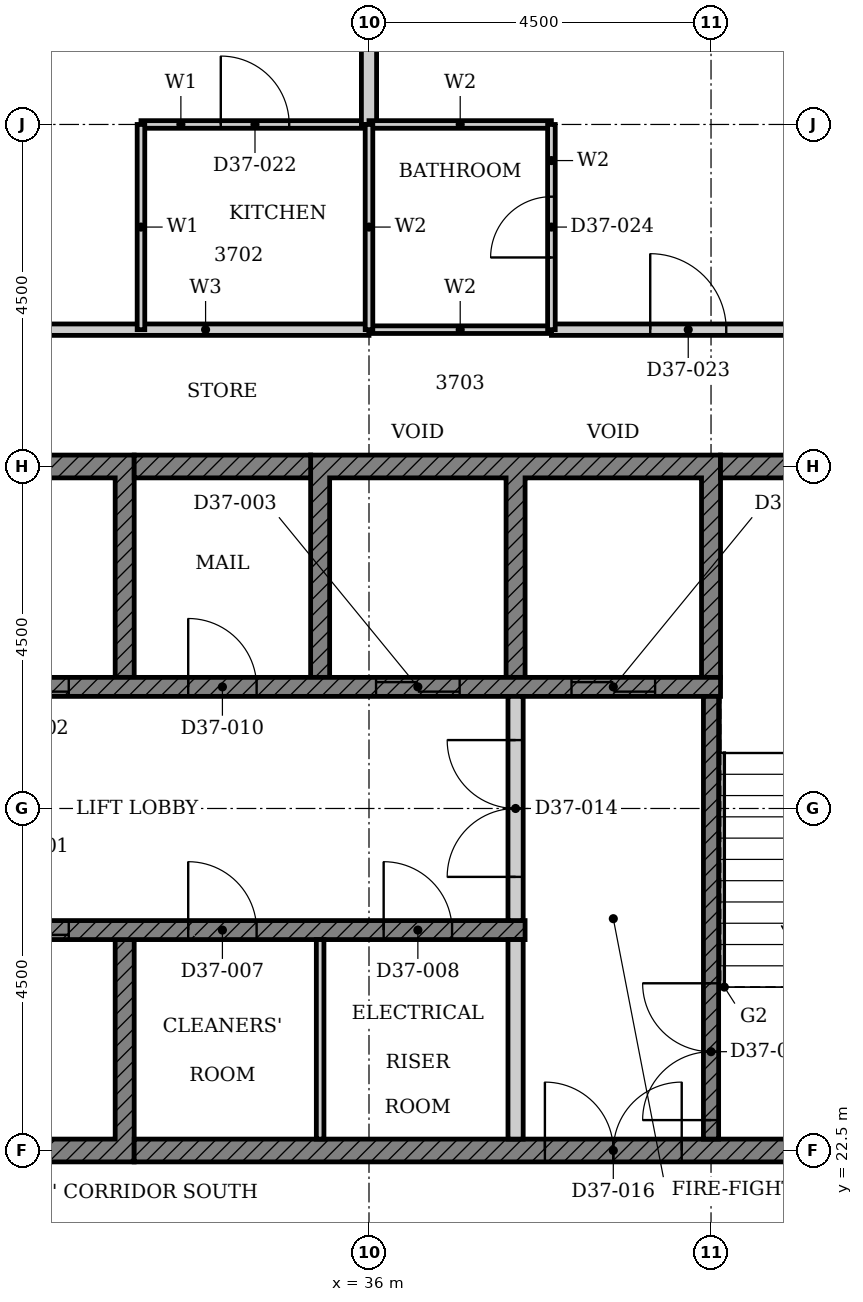
"""IFC4 building model, lengths in metres.
Left out: names, types, materials, properties, quantities, classifications, styles, units other than length and angle.
Written with IfcOpenShell. Run it as: python <this file> out.ifc"""

import sys

from ifc_helpers import new_model, si_unit, direction, frame, frame_2d, origin, place, context, subcontext, project, spatial, polyline, rectangle, outline, extrude, element, fill, save


model = new_model("IFC4")
c1 = context("Model", 3, precision=1e-05, world=origin(), true_north=direction((0.0, 1.0)))
c2 = subcontext(c1, "Body", "Model", "MODEL_VIEW")
j1 = project(units=[si_unit("LENGTHUNIT", "METRE"), si_unit("PLANEANGLEUNIT", "RADIAN")], contexts=[c1])
p1 = place(None, origin())
s1 = spatial("IfcSite", under=j1, at=p1, CompositionType="ELEMENT")
p2 = place(p1, origin())
s2 = spatial("IfcBuilding", under=s1, at=p2, CompositionType="ELEMENT")
p3 = place(p2, frame((0.0, 0.0, 150.6)))
s3 = spatial("IfcBuildingStorey", under=s2, at=p3, CompositionType="ELEMENT", Elevation=150.6)
p4 = place(p3, origin())
e1 = element("IfcWall", 1, at=p4, inside=s3, PredefinedType="SHEAR", context=c2, shape_type="SweptSolid", body=[
    extrude(outline(polyline([(27.518, 22.35), (32.911, 22.35), (32.911, 25.275), (32.661, 25.275), (32.661, 22.65), (30.339, 22.65), (30.339, 25.275), (30.089, 25.275), (30.089, 22.65), (27.768, 22.65), (27.768, 25.275), (27.518, 25.275), (27.518, 22.35)])), origin(), (0.0, 0.0, 1.0), 3.4),
])
p5 = place(p3, origin())
e2 = element("IfcWall", 2, at=p5, inside=s3, PredefinedType="SHEAR", context=c2, shape_type="SweptSolid", body=[
    extrude(outline(polyline([(27.518, 28.725), (27.768, 28.725), (27.768, 31.35), (30.089, 31.35), (30.089, 28.725), (30.339, 28.725), (30.339, 31.35), (32.661, 31.35), (32.661, 28.725), (32.911, 28.725), (32.911, 31.65), (27.518, 31.65), (27.518, 28.725)])), origin(), (0.0, 0.0, 1.0), 3.4),
])
p6 = place(p3, origin())
e3 = element("IfcWall", 3, at=p6, inside=s3, PredefinedType="SHEAR", context=c2, shape_type="SweptSolid", body=[
    extrude(outline(polyline([(35.232, 28.725), (35.482, 28.725), (35.482, 31.35), (37.803, 31.35), (37.803, 28.725), (38.053, 28.725), (38.053, 31.35), (40.375, 31.35), (40.375, 28.725), (40.625, 28.725), (40.625, 31.65), (35.232, 31.65), (35.232, 28.725)])), origin(), (0.0, 0.0, 1.0), 3.4),
])
p7 = place(p3, frame((32.911, 22.5, 0.0), z_axis=(0.0, 0.0, 1.0), x_axis=(1.0, 0.0, 0.0)))
e4 = element("IfcWall", 4, at=p7, inside=s3, PredefinedType="SHEAR", context=c2, shape_type="SweptSolid", body=[
    extrude(rectangle(XDim=11.939, YDim=0.3, at=frame_2d((5.97, 0.0))), origin(), (0.0, 0.0, 1.0), 3.4),
])
p8 = place(p7, frame((5.404, 0.0, 0.0)))
e5 = element("IfcOpeningElement", 5, at=p8, cuts=e4, PredefinedType="OPENING", context=c2, shape_type="SweptSolid", body=[
    extrude(rectangle(XDim=1.8, YDim=2.1, at=frame_2d((0.9, 1.05))), frame((0.0, 0.16, 0.0), z_axis=(0.0, -1.0, 0.0), x_axis=(1.0, 0.0, 0.0)), (0.0, 0.0, 1.0), 0.32),
])
p9 = place(p3, frame((32.911, 31.5, 0.0), z_axis=(0.0, 0.0, 1.0), x_axis=(1.0, 0.0, 0.0)))
e6 = element("IfcWall", 6, at=p9, inside=s3, PredefinedType="SHEAR", context=c2, shape_type="SweptSolid", body=[
    extrude(rectangle(XDim=2.322, YDim=0.3, at=frame_2d((1.161, 0.0))), origin(), (0.0, 0.0, 1.0), 3.4),
])
p10 = place(p3, frame((40.625, 31.5, 0.0), z_axis=(0.0, 0.0, 1.0), x_axis=(1.0, 0.0, 0.0)))
e7 = element("IfcWall", 7, at=p10, inside=s3, PredefinedType="SHEAR", context=c2, shape_type="SweptSolid", body=[
    extrude(rectangle(XDim=4.225, YDim=0.3, at=frame_2d((2.113, 0.0))), origin(), (0.0, 0.0, 1.0), 3.4),
])
p11 = place(p3, frame((22.375, 25.4, 0.0), z_axis=(0.0, 0.0, 1.0), x_axis=(1.0, 0.0, 0.0)))
e8 = element("IfcWall", 8, at=p11, inside=s3, PredefinedType="SHEAR", context=c2, shape_type="SweptSolid", body=[
    extrude(rectangle(XDim=15.678, YDim=0.25, at=frame_2d((7.839, 0.0))), origin(), (0.0, 0.0, 1.0), 3.4),
])
p12 = place(p11, frame((8.575, 0.0, 0.0)))
e9 = element("IfcOpeningElement", 9, at=p12, cuts=e8, PredefinedType="OPENING", context=c2, shape_type="SweptSolid", body=[
    extrude(rectangle(XDim=1.1, YDim=2.1, at=frame_2d((0.55, 1.05))), frame((0.0, 0.135, 0.0), z_axis=(0.0, -1.0, 0.0), x_axis=(1.0, 0.0, 0.0)), (0.0, 0.0, 1.0), 0.27),
])
p13 = place(p11, frame((0.861, 0.0, 0.0)))
e10 = element("IfcOpeningElement", 10, at=p13, cuts=e8, PredefinedType="OPENING", context=c2, shape_type="SweptSolid", body=[
    extrude(rectangle(XDim=1.1, YDim=2.1, at=frame_2d((0.55, 1.05))), frame((0.0, 0.135, 0.0), z_axis=(0.0, -1.0, 0.0), x_axis=(1.0, 0.0, 0.0)), (0.0, 0.0, 1.0), 0.27),
])
p14 = place(p11, frame((3.532, 0.0, 0.0)))
e11 = element("IfcOpeningElement", 11, at=p14, cuts=e8, PredefinedType="OPENING", context=c2, shape_type="SweptSolid", body=[
    extrude(rectangle(XDim=0.9, YDim=2.1, at=frame_2d((0.45, 1.05))), frame((0.0, 0.135, 0.0), z_axis=(0.0, -1.0, 0.0), x_axis=(1.0, 0.0, 0.0)), (0.0, 0.0, 1.0), 0.27),
])
p15 = place(p11, frame((11.246, 0.0, 0.0)))
e12 = element("IfcOpeningElement", 12, at=p15, cuts=e8, PredefinedType="OPENING", context=c2, shape_type="SweptSolid", body=[
    extrude(rectangle(XDim=0.9, YDim=2.1, at=frame_2d((0.45, 1.05))), frame((0.0, 0.135, 0.0), z_axis=(0.0, -1.0, 0.0), x_axis=(1.0, 0.0, 0.0)), (0.0, 0.0, 1.0), 0.27),
])
p16 = place(p11, frame((13.818, 0.0, 0.0)))
e13 = element("IfcOpeningElement", 13, at=p16, cuts=e8, PredefinedType="OPENING", context=c2, shape_type="SweptSolid", body=[
    extrude(rectangle(XDim=0.9, YDim=2.1, at=frame_2d((0.45, 1.05))), frame((0.0, 0.135, 0.0), z_axis=(0.0, -1.0, 0.0), x_axis=(1.0, 0.0, 0.0)), (0.0, 0.0, 1.0), 0.27),
])
p17 = place(p3, frame((24.947, 28.6, 0.0), z_axis=(0.0, 0.0, 1.0), x_axis=(1.0, 0.0, 0.0)))
e14 = element("IfcWall", 14, at=p17, inside=s3, PredefinedType="SHEAR", context=c2, shape_type="SweptSolid", body=[
    extrude(rectangle(XDim=15.678, YDim=0.25, at=frame_2d((7.839, 0.0))), origin(), (0.0, 0.0, 1.0), 3.4),
])
p18 = place(p17, frame((6.004, 0.0, 0.0)))
e15 = element("IfcOpeningElement", 15, at=p18, cuts=e14, PredefinedType="OPENING", context=c2, shape_type="SweptSolid", body=[
    extrude(rectangle(XDim=1.1, YDim=2.1, at=frame_2d((0.55, 1.05))), frame((0.0, 0.135, 0.0), z_axis=(0.0, -1.0, 0.0), x_axis=(1.0, 0.0, 0.0)), (0.0, 0.0, 1.0), 0.27),
])
p19 = place(p17, frame((11.146, 0.0, 0.0)))
e16 = element("IfcOpeningElement", 16, at=p19, cuts=e14, PredefinedType="OPENING", context=c2, shape_type="SweptSolid", body=[
    extrude(rectangle(XDim=1.1, YDim=2.1, at=frame_2d((0.55, 1.05))), frame((0.0, 0.135, 0.0), z_axis=(0.0, -1.0, 0.0), x_axis=(1.0, 0.0, 0.0)), (0.0, 0.0, 1.0), 0.27),
])
p20 = place(p17, frame((13.718, 0.0, 0.0)))
e17 = element("IfcOpeningElement", 17, at=p20, cuts=e14, PredefinedType="OPENING", context=c2, shape_type="SweptSolid", body=[
    extrude(rectangle(XDim=1.1, YDim=2.1, at=frame_2d((0.55, 1.05))), frame((0.0, 0.135, 0.0), z_axis=(0.0, -1.0, 0.0), x_axis=(1.0, 0.0, 0.0)), (0.0, 0.0, 1.0), 0.27),
])
p21 = place(p17, frame((0.961, 0.0, 0.0)))
e18 = element("IfcOpeningElement", 18, at=p21, cuts=e14, PredefinedType="OPENING", context=c2, shape_type="SweptSolid", body=[
    extrude(rectangle(XDim=0.9, YDim=2.1, at=frame_2d((0.45, 1.05))), frame((0.0, 0.135, 0.0), z_axis=(0.0, -1.0, 0.0), x_axis=(1.0, 0.0, 0.0)), (0.0, 0.0, 1.0), 0.27),
])
p22 = place(p17, frame((8.675, 0.0, 0.0)))
e19 = element("IfcOpeningElement", 19, at=p22, cuts=e14, PredefinedType="OPENING", context=c2, shape_type="SweptSolid", body=[
    extrude(rectangle(XDim=0.9, YDim=2.1, at=frame_2d((0.45, 1.05))), frame((0.0, 0.135, 0.0), z_axis=(0.0, -1.0, 0.0), x_axis=(1.0, 0.0, 0.0)), (0.0, 0.0, 1.0), 0.27),
])
p23 = place(p3, frame((37.928, 22.65, 0.0), z_axis=(0.0, 0.0, 1.0), x_axis=(0.0, 1.0, 0.0)))
e20 = element("IfcWall", 20, at=p23, inside=s3, PredefinedType="PARTITIONING", context=c2, shape_type="SweptSolid", body=[
    extrude(rectangle(XDim=2.625, YDim=0.2, at=frame_2d((1.312, 0.0))), origin(), (0.0, 0.0, 1.0), 3.4),
])
p24 = place(p3, frame((35.357, 22.65, 0.0), z_axis=(0.0, 0.0, 1.0), x_axis=(0.0, 1.0, 0.0)))
e21 = element("IfcWall", 21, at=p24, inside=s3, PredefinedType="PARTITIONING", context=c2, shape_type="SweptSolid", body=[
    extrude(rectangle(XDim=2.625, YDim=0.1, at=frame_2d((1.312, 0.0))), origin(), (0.0, 0.0, 1.0), 3.4),
])
p25 = place(p3, frame((40.5, 22.65, 0.0), z_axis=(0.0, 0.0, 1.0), x_axis=(0.0, 1.0, 0.0)))
e22 = element("IfcWall", 22, at=p25, inside=s3, PredefinedType="SHEAR", context=c2, shape_type="SweptSolid", body=[
    extrude(rectangle(XDim=5.825, YDim=0.2, at=frame_2d((2.913, 0.0))), origin(), (0.0, 0.0, 1.0), 3.4),
])
p26 = place(p25, frame((0.25, 0.0, 0.0)))
e23 = element("IfcOpeningElement", 23, at=p26, cuts=e22, PredefinedType="OPENING", context=c2, shape_type="SweptSolid", body=[
    extrude(rectangle(XDim=1.8, YDim=2.1, at=frame_2d((0.9, 1.05))), frame((0.0, 0.11, 0.0), z_axis=(0.0, -1.0, 0.0), x_axis=(1.0, 0.0, 0.0)), (0.0, 0.0, 1.0), 0.22),
])
p27 = place(p3, frame((37.928, 25.525, 0.0), z_axis=(0.0, 0.0, 1.0), x_axis=(0.0, 1.0, 0.0)))
e24 = element("IfcWall", 24, at=p27, inside=s3, PredefinedType="PARTITIONING", context=c2, shape_type="SweptSolid", body=[
    extrude(rectangle(XDim=2.95, YDim=0.2, at=frame_2d((1.475, 0.0))), origin(), (0.0, 0.0, 1.0), 3.4),
])
p28 = place(p27, frame((0.575, 0.0, 0.0)))
e25 = element("IfcOpeningElement", 25, at=p28, cuts=e24, PredefinedType="OPENING", context=c2, shape_type="SweptSolid", body=[
    extrude(rectangle(XDim=1.8, YDim=2.1, at=frame_2d((0.9, 1.05))), frame((0.0, 0.11, 0.0), z_axis=(0.0, -1.0, 0.0), x_axis=(1.0, 0.0, 0.0)), (0.0, 0.0, 1.0), 0.22),
])
p29 = place(p3, frame((29.4, 33.3, 0.0), z_axis=(0.0, 0.0, 1.0), x_axis=(1.0, 0.0, 0.0)))
e26 = element("IfcWall", 26, at=p29, inside=s3, PredefinedType="PARTITIONING", context=c2, shape_type="SweptSolid", body=[
    extrude(rectangle(XDim=6.6, YDim=0.15, at=frame_2d((3.3, 0.0))), origin(), (0.0, 0.0, 1.0), 3.4),
])
p30 = place(p29, frame((1.3, 0.0, 0.0)))
e27 = element("IfcOpeningElement", 27, at=p30, cuts=e26, PredefinedType="OPENING", context=c2, shape_type="SweptSolid", body=[
    extrude(rectangle(XDim=1.0, YDim=2.2, at=frame_2d((0.5, 1.1))), frame((0.0, 0.085, 0.0), z_axis=(0.0, -1.0, 0.0), x_axis=(1.0, 0.0, 0.0)), (0.0, 0.0, 1.0), 0.17),
])
p31 = place(p3, frame((38.4, 33.3, 0.0), z_axis=(0.0, 0.0, 1.0), x_axis=(1.0, 0.0, 0.0)))
e28 = element("IfcWall", 28, at=p31, inside=s3, PredefinedType="PARTITIONING", context=c2, shape_type="SweptSolid", body=[
    extrude(rectangle(XDim=6.6, YDim=0.15, at=frame_2d((3.3, 0.0))), origin(), (0.0, 0.0, 1.0), 3.4),
])
p32 = place(p31, frame((1.3, 0.0, 0.0)))
e29 = element("IfcOpeningElement", 29, at=p32, cuts=e28, PredefinedType="OPENING", context=c2, shape_type="SweptSolid", body=[
    extrude(rectangle(XDim=1.0, YDim=2.2, at=frame_2d((0.5, 1.1))), frame((0.0, 0.085, 0.0), z_axis=(0.0, -1.0, 0.0), x_axis=(1.0, 0.0, 0.0)), (0.0, 0.0, 1.0), 0.17),
])
p33 = place(p3, frame((33.0, 36.0, 0.0), z_axis=(0.0, 0.0, 1.0), x_axis=(1.0, 0.0, 0.0)))
e30 = element("IfcWall", 30, at=p33, inside=s3, PredefinedType="PARTITIONING", context=c2, shape_type="SweptSolid", body=[
    extrude(rectangle(XDim=3.0, YDim=0.1, at=frame_2d((1.5, 0.0))), origin(), (0.0, 0.0, 1.0), 3.4),
])
p34 = place(p33, frame((1.05, 0.0, 0.0)))
e31 = element("IfcOpeningElement", 31, at=p34, cuts=e30, PredefinedType="OPENING", context=c2, shape_type="SweptSolid", body=[
    extrude(rectangle(XDim=0.9, YDim=2.1, at=frame_2d((0.45, 1.05))), frame((0.0, 0.06, 0.0), z_axis=(0.0, -1.0, 0.0), x_axis=(1.0, 0.0, 0.0)), (0.0, 0.0, 1.0), 0.12),
])
p35 = place(p3, frame((33.0, 33.3, 0.0), z_axis=(0.0, 0.0, 1.0), x_axis=(0.0, 1.0, 0.0)))
e32 = element("IfcWall", 32, at=p35, inside=s3, PredefinedType="PARTITIONING", context=c2, shape_type="SweptSolid", body=[
    extrude(rectangle(XDim=2.7, YDim=0.1, at=frame_2d((1.35, 0.0))), origin(), (0.0, 0.0, 1.0), 3.4),
])
p36 = place(p3, frame((36.0, 36.0, 0.0), z_axis=(0.0, 0.0, 1.0), x_axis=(0.0, 1.0, 0.0)))
e33 = element("IfcWall", 33, at=p36, inside=s3, PredefinedType="PARTITIONING", context=c2, shape_type="SweptSolid", body=[
    extrude(rectangle(XDim=4.69, YDim=0.2, at=frame_2d((2.345, 0.0))), origin(), (0.0, 0.0, 1.0), 3.4),
])
for number, where, z_axis, x_axis in (
    (34, (36.0, 33.3, 0.0), (0.0, 0.0, 1.0), (1.0, 0.0, 0.0)),
    (35, (36.0, 36.0, 0.0), (0.0, 0.0, 1.0), (1.0, 0.0, 0.0)),
):
    element("IfcWall", number, at=place(p3, frame(where, z_axis=z_axis, x_axis=x_axis)), inside=s3, PredefinedType="PARTITIONING", context=c2, shape_type="SweptSolid", body=[
        extrude(rectangle(XDim=2.4, YDim=0.1, at=frame_2d((1.2, 0.0))), origin(), (0.0, 0.0, 1.0), 3.4),
    ])
p37 = place(p3, frame((36.0, 33.3, 0.0), z_axis=(0.0, 0.0, 1.0), x_axis=(0.0, 1.0, 0.0)))
e36 = element("IfcWall", 36, at=p37, inside=s3, PredefinedType="PARTITIONING", context=c2, shape_type="SweptSolid", body=[
    extrude(rectangle(XDim=2.7, YDim=0.1, at=frame_2d((1.35, 0.0))), origin(), (0.0, 0.0, 1.0), 3.4),
])
p38 = place(p3, frame((38.4, 33.3, 0.0), z_axis=(0.0, 0.0, 1.0), x_axis=(0.0, 1.0, 0.0)))
e37 = element("IfcWall", 37, at=p38, inside=s3, PredefinedType="PARTITIONING", context=c2, shape_type="SweptSolid", body=[
    extrude(rectangle(XDim=2.7, YDim=0.1, at=frame_2d((1.35, 0.0))), origin(), (0.0, 0.0, 1.0), 3.4),
])
p39 = place(p38, frame((0.95, 0.0, 0.0)))
e38 = element("IfcOpeningElement", 38, at=p39, cuts=e37, PredefinedType="OPENING", context=c2, shape_type="SweptSolid", body=[
    extrude(rectangle(XDim=0.8, YDim=2.1, at=frame_2d((0.4, 1.05))), frame((0.0, 0.06, 0.0), z_axis=(0.0, -1.0, 0.0), x_axis=(1.0, 0.0, 0.0)), (0.0, 0.0, 1.0), 0.12),
])
p40 = place(p12, origin())
e39 = element("IfcDoor", 39, at=p40, inside=s3, OperationType="DOUBLE_DOOR_SLIDING", PredefinedType="DOOR", context=c2, shape_type="SweptSolid", body=[
    extrude(rectangle(XDim=1.1, YDim=2.1, at=frame_2d((0.55, 1.05))), frame((0.0, 0.025, 0.0), z_axis=(0.0, -1.0, 0.0), x_axis=(1.0, 0.0, 0.0)), (0.0, 0.0, 1.0), 0.05),
])
fill(e9, e39)
p41 = place(p18, origin())
e40 = element("IfcDoor", 40, at=p41, inside=s3, OperationType="DOUBLE_DOOR_SLIDING", PredefinedType="DOOR", context=c2, shape_type="SweptSolid", body=[
    extrude(rectangle(XDim=1.1, YDim=2.1, at=frame_2d((0.55, 1.05))), frame((0.0, 0.025, 0.0), z_axis=(0.0, -1.0, 0.0), x_axis=(1.0, 0.0, 0.0)), (0.0, 0.0, 1.0), 0.05),
])
fill(e15, e40)
p42 = place(p19, origin())
e41 = element("IfcDoor", 41, at=p42, inside=s3, OperationType="DOUBLE_DOOR_SLIDING", PredefinedType="DOOR", context=c2, shape_type="SweptSolid", body=[
    extrude(rectangle(XDim=1.1, YDim=2.1, at=frame_2d((0.55, 1.05))), frame((0.0, 0.025, 0.0), z_axis=(0.0, -1.0, 0.0), x_axis=(1.0, 0.0, 0.0)), (0.0, 0.0, 1.0), 0.05),
])
fill(e16, e41)
p43 = place(p20, origin())
e42 = element("IfcDoor", 42, at=p43, inside=s3, OperationType="DOUBLE_DOOR_SLIDING", PredefinedType="DOOR", context=c2, shape_type="SweptSolid", body=[
    extrude(rectangle(XDim=1.1, YDim=2.1, at=frame_2d((0.55, 1.05))), frame((0.0, 0.025, 0.0), z_axis=(0.0, -1.0, 0.0), x_axis=(1.0, 0.0, 0.0)), (0.0, 0.0, 1.0), 0.05),
])
fill(e17, e42)
p44 = place(p15, origin())
e43 = element("IfcDoor", 43, at=p44, inside=s3, OperationType="SINGLE_SWING_LEFT", PredefinedType="DOOR", context=c2, shape_type="SweptSolid", body=[
    extrude(rectangle(XDim=0.9, YDim=2.1, at=frame_2d((0.45, 1.05))), frame((0.0, 0.025, 0.0), z_axis=(0.0, -1.0, 0.0), x_axis=(1.0, 0.0, 0.0)), (0.0, 0.0, 1.0), 0.05),
])
fill(e12, e43)
p45 = place(p16, origin())
e44 = element("IfcDoor", 44, at=p45, inside=s3, OperationType="SINGLE_SWING_LEFT", PredefinedType="DOOR", context=c2, shape_type="SweptSolid", body=[
    extrude(rectangle(XDim=0.9, YDim=2.1, at=frame_2d((0.45, 1.05))), frame((0.0, 0.025, 0.0), z_axis=(0.0, -1.0, 0.0), x_axis=(1.0, 0.0, 0.0)), (0.0, 0.0, 1.0), 0.05),
])
fill(e13, e44)
p46 = place(p22, origin())
e45 = element("IfcDoor", 45, at=p46, inside=s3, OperationType="SINGLE_SWING_LEFT", PredefinedType="DOOR", context=c2, shape_type="SweptSolid", body=[
    extrude(rectangle(XDim=0.9, YDim=2.1, at=frame_2d((0.45, 1.05))), frame((0.0, 0.025, 0.0), z_axis=(0.0, -1.0, 0.0), x_axis=(1.0, 0.0, 0.0)), (0.0, 0.0, 1.0), 0.05),
])
fill(e19, e45)
p47 = place(p26, origin())
e46 = element("IfcDoor", 46, at=p47, inside=s3, OperationType="DOUBLE_DOOR_SINGLE_SWING", PredefinedType="DOOR", context=c2, shape_type="SweptSolid", body=[
    extrude(rectangle(XDim=1.8, YDim=2.1, at=frame_2d((0.9, 1.05))), frame((0.0, 0.025, 0.0), z_axis=(0.0, -1.0, 0.0), x_axis=(1.0, 0.0, 0.0)), (0.0, 0.0, 1.0), 0.05),
])
fill(e23, e46)
p48 = place(p28, origin())
e47 = element("IfcDoor", 47, at=p48, inside=s3, OperationType="DOUBLE_DOOR_SINGLE_SWING", PredefinedType="DOOR", context=c2, shape_type="SweptSolid", body=[
    extrude(rectangle(XDim=1.8, YDim=2.1, at=frame_2d((0.9, 1.05))), frame((0.0, 0.025, 0.0), z_axis=(0.0, -1.0, 0.0), x_axis=(1.0, 0.0, 0.0)), (0.0, 0.0, 1.0), 0.05),
])
fill(e25, e47)
p49 = place(p8, origin())
e48 = element("IfcDoor", 48, at=p49, inside=s3, OperationType="DOUBLE_DOOR_SINGLE_SWING", PredefinedType="DOOR", context=c2, shape_type="SweptSolid", body=[
    extrude(rectangle(XDim=1.8, YDim=2.1, at=frame_2d((0.9, 1.05))), frame((0.0, 0.025, 0.0), z_axis=(0.0, -1.0, 0.0), x_axis=(1.0, 0.0, 0.0)), (0.0, 0.0, 1.0), 0.05),
])
fill(e5, e48)
p50 = place(p34, origin())
e49 = element("IfcDoor", 49, at=p50, inside=s3, OperationType="SINGLE_SWING_LEFT", PredefinedType="DOOR", context=c2, shape_type="SweptSolid", body=[
    extrude(rectangle(XDim=0.9, YDim=2.1, at=frame_2d((0.45, 1.05))), frame((0.0, 0.025, 0.0), z_axis=(0.0, -1.0, 0.0), x_axis=(1.0, 0.0, 0.0)), (0.0, 0.0, 1.0), 0.05),
])
fill(e31, e49)
p51 = place(p32, origin())
e50 = element("IfcDoor", 50, at=p51, inside=s3, OperationType="SINGLE_SWING_LEFT", PredefinedType="DOOR", context=c2, shape_type="SweptSolid", body=[
    extrude(rectangle(XDim=1.0, YDim=2.2, at=frame_2d((0.5, 1.1))), frame((0.0, 0.025, 0.0), z_axis=(0.0, -1.0, 0.0), x_axis=(1.0, 0.0, 0.0)), (0.0, 0.0, 1.0), 0.05),
])
fill(e29, e50)
p52 = place(p39, origin())
e51 = element("IfcDoor", 51, at=p52, inside=s3, OperationType="SINGLE_SWING_RIGHT", PredefinedType="DOOR", context=c2, shape_type="SweptSolid", body=[
    extrude(rectangle(XDim=0.8, YDim=2.1, at=frame_2d((0.4, 1.05))), frame((0.0, 0.025, 0.0), z_axis=(0.0, -1.0, 0.0), x_axis=(1.0, 0.0, 0.0)), (0.0, 0.0, 1.0), 0.05),
])
fill(e38, e51)
save(model, sys.argv[1])
